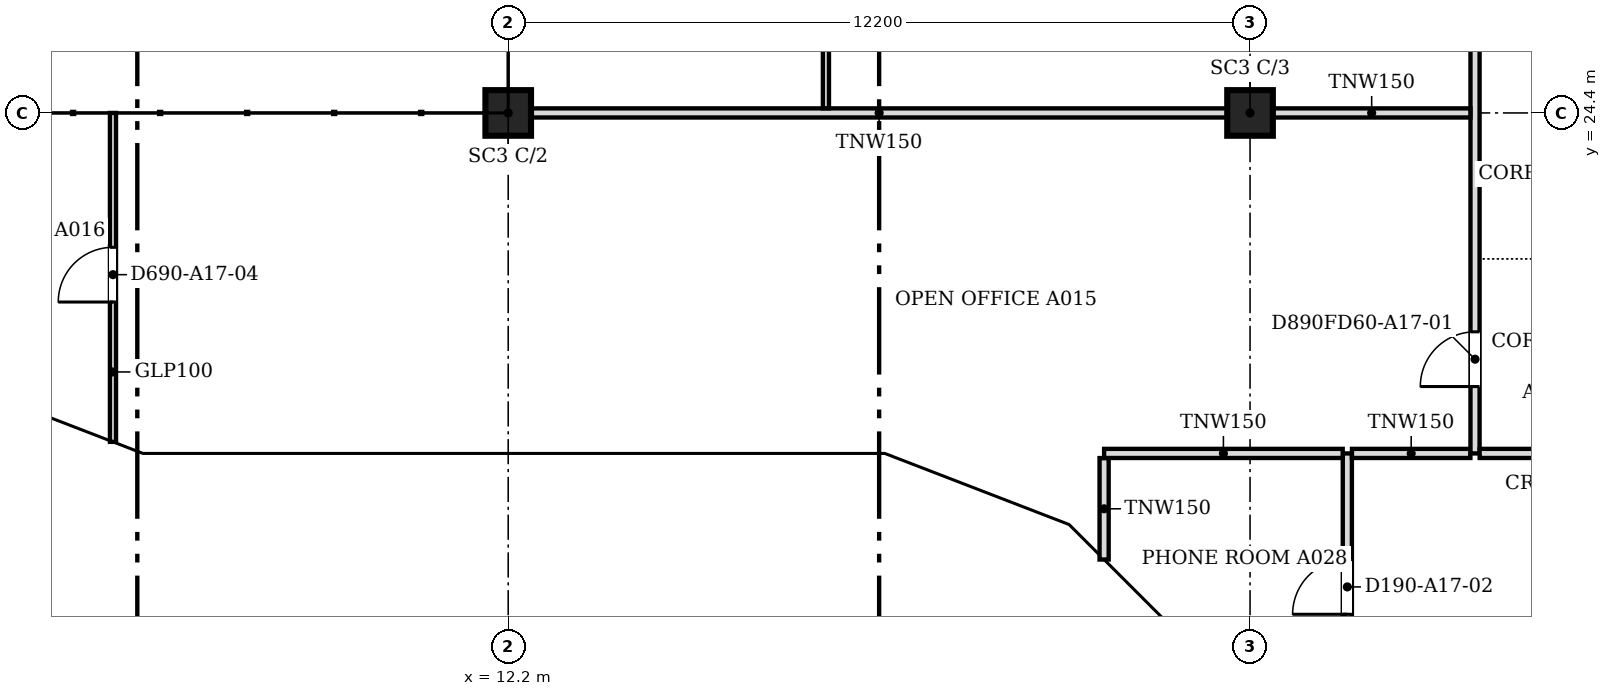
"""IFC4 building model, lengths in metres.
Left out: names, types, materials, properties, quantities, classifications, styles, units other than length and angle.
Written with IfcOpenShell. Run it as: python <this file> out.ifc"""

import sys

from ifc_helpers import new_model, si_unit, direction, frame, frame_2d, origin, origin_2d, place, context, subcontext, project, spatial, polyline, rectangle, outline, extrude, faceted_brep, source, transform, mapped, element, fill, save


model = new_model("IFC4")
c1 = context("Model", 3, precision=1e-05, world=origin(), true_north=direction((0.0, 1.0)))
c2 = subcontext(c1, "Body", "Model", "MODEL_VIEW")
j1 = project(units=[si_unit("LENGTHUNIT", "METRE"), si_unit("PLANEANGLEUNIT", "RADIAN")], contexts=[c1])
p1 = place(None, origin())
s1 = spatial("IfcSite", under=j1, at=p1, CompositionType="ELEMENT")
p2 = place(p1, origin())
s2 = spatial("IfcBuilding", under=s1, at=p2, CompositionType="ELEMENT")
p3 = place(p2, frame((0.0, 0.0, 185.8)))
s3 = spatial("IfcBuildingStorey", under=s2, at=p3, CompositionType="ELEMENT", Elevation=185.8)
for number, where, z_axis, x_axis in (
    (1, (12.2, 24.4, 0.0), (0.0, 0.0, 1.0), (1.0, 0.0, 0.0)),
    (2, (24.4, 24.4, 0.0), (0.0, 0.0, 1.0), (1.0, 0.0, 0.0)),
):
    element("IfcColumn", number, at=place(p3, frame(where, z_axis=z_axis, x_axis=x_axis)), inside=s3, PredefinedType="COLUMN", context=c2, shape_type="SweptSolid", body=[
        extrude(rectangle(XDim=0.75, YDim=0.75, at=origin_2d()), origin(), (0.0, 0.0, 1.0), 3.6),
    ])
m1 = source(origin(), c2, "Body", "Brep", [
    faceted_brep([(2.95, -0.25, 0.0), (2.997, -0.25, 0.059), (2.997, -0.25, 7.541), (2.95, -0.25, 7.6), (0.0, -0.25, 3.8), (0.053, 0.25, 3.868), (2.904, 0.25, 7.54), (2.904, 0.25, 0.06), (0.053, 0.25, 3.732), (2.95, 0.0, 0.0), (2.95, 0.0, 7.6), (0.0, 0.0, 3.8)], [[[0, 1, 2, 3, 4]], [[5, 6, 7, 8]], [[1, 0, 9]], [[10, 3, 2]], [[6, 5, 11, 4, 3, 10]], [[8, 7, 9, 0, 4, 11]], [[8, 11, 5]], [[1, 9, 7, 6, 10, 2]]]),
])
p4 = place(p3, frame((3.394, 19.612, -3.8), z_axis=(0.0, 0.0, 1.0), x_axis=(0.932990326376, -0.359901446078, 0.0)))
e3 = element("IfcWall", 3, at=p4, inside=s3, PredefinedType="SOLIDWALL", context=c2, shape_type="MappedRepresentation", body=[
    mapped(m1, transform((0.0, 0.0, 0.0), scale=1.0)),
])
m2 = source(origin(), c2, "Body", "SweptSolid", [
    extrude(outline(polyline([(2.75, 6.935), (0.316, 3.8), (2.75, 0.665), (2.75, 6.935)])), frame((0.0, 0.26, 0.0), z_axis=(0.0, -1.0, 0.0), x_axis=(1.0, 0.0, 0.0)), (0.0, 0.0, 1.0), 0.52),
])
p5 = place(p4, origin())
e4 = element("IfcOpeningElement", 4, at=p5, cuts=e3, PredefinedType="OPENING", context=c2, shape_type="MappedRepresentation", body=[
    mapped(m2, transform((0.0, 0.0, 0.0), scale=1.0)),
])
m3 = source(origin(), c2, "Body", "Brep", [
    faceted_brep([(0.047, -0.25, 0.0), (3.05, -0.25, 3.8), (0.047, -0.25, 7.6), (0.0, -0.25, 7.54), (0.0, -0.25, 0.06), (0.093, 0.25, 7.541), (3.05, 0.25, 3.8), (0.093, 0.25, 0.059), (0.047, 0.0, 0.0), (0.047, 0.0, 7.6)], [[[0, 1, 2, 3, 4]], [[5, 6, 7]], [[7, 6, 1, 0, 8]], [[6, 5, 9, 2, 1]], [[3, 2, 9]], [[8, 0, 4]], [[7, 8, 4, 3, 9, 5]]]),
])
p6 = place(p3, frame((6.1, 18.55, -3.8), z_axis=(0.0, 0.0, 1.0), x_axis=(1.0, 0.0, 0.0)))
e5 = element("IfcWall", 5, at=p6, inside=s3, PredefinedType="SOLIDWALL", context=c2, shape_type="MappedRepresentation", body=[
    mapped(m3, transform((0.0, 0.0, 0.0), scale=1.0)),
])
m4 = source(origin(), c2, "Body", "SweptSolid", [
    extrude(outline(polyline([(0.247, 0.656), (2.731, 3.8), (0.247, 6.944), (0.247, 0.656)])), frame((0.0, 0.26, 0.0), z_axis=(0.0, -1.0, 0.0), x_axis=(1.0, 0.0, 0.0)), (0.0, 0.0, 1.0), 0.52),
])
p7 = place(p6, origin())
e6 = element("IfcOpeningElement", 6, at=p7, cuts=e5, PredefinedType="OPENING", context=c2, shape_type="MappedRepresentation", body=[
    mapped(m4, transform((0.0, 0.0, 0.0), scale=1.0)),
])
m5 = source(origin(), c2, "Body", "SweptSolid", [
    extrude(outline(polyline([(3.05, 0.0), (6.1, 3.8), (3.05, 7.6), (0.0, 3.8), (3.05, 0.0)])), frame((0.0, 0.25, 0.0), z_axis=(0.0, -1.0, 0.0), x_axis=(1.0, 0.0, 0.0)), (0.0, 0.0, 1.0), 0.5),
])
p8 = place(p3, frame((9.15, 18.55, -3.8), z_axis=(0.0, 0.0, 1.0), x_axis=(1.0, 0.0, 0.0)))
e7 = element("IfcWall", 7, at=p8, inside=s3, PredefinedType="SOLIDWALL", context=c2, shape_type="MappedRepresentation", body=[
    mapped(m5, transform((0.0, 0.0, 0.0), scale=1.0)),
])
m6 = source(origin(), c2, "Body", "SweptSolid", [
    extrude(outline(polyline([(3.05, 0.399), (5.78, 3.8), (3.05, 7.201), (0.321, 3.8), (3.05, 0.399)])), frame((0.0, 0.26, 0.0), z_axis=(0.0, -1.0, 0.0), x_axis=(1.0, 0.0, 0.0)), (0.0, 0.0, 1.0), 0.52),
])
p9 = place(p8, origin())
e8 = element("IfcOpeningElement", 8, at=p9, cuts=e7, PredefinedType="OPENING", context=c2, shape_type="MappedRepresentation", body=[
    mapped(m6, transform((0.0, 0.0, 0.0), scale=1.0)),
])
m7 = source(origin(), c2, "Body", "Brep", [
    faceted_brep([(3.05, -0.25, 7.543), (0.0, -0.25, 3.8), (3.05, -0.25, 0.057), (0.0, 0.25, 3.8), (3.096, 0.25, 7.6), (3.143, 0.25, 7.544), (3.143, 0.25, 0.056), (3.096, 0.25, 0.0), (3.096, -0.0, 0.0), (3.096, -0.0, 7.6)], [[[0, 1, 2]], [[3, 4, 5, 6, 7]], [[7, 6, 8]], [[5, 4, 9]], [[4, 3, 1, 0, 9]], [[3, 7, 8, 2, 1]], [[2, 8, 6, 5, 9, 0]]]),
])
p10 = place(p3, frame((15.25, 18.55, -3.8), z_axis=(0.0, 0.0, 1.0), x_axis=(1.0, 0.0, 0.0)))
e9 = element("IfcWall", 9, at=p10, inside=s3, PredefinedType="SOLIDWALL", context=c2, shape_type="MappedRepresentation", body=[
    mapped(m7, transform((0.0, 0.0, 0.0), scale=1.0)),
])
m8 = source(origin(), c2, "Body", "SweptSolid", [
    extrude(outline(polyline([(2.896, 6.959), (0.323, 3.8), (2.896, 0.641), (2.896, 6.959)])), frame((0.0, 0.26, 0.0), z_axis=(0.0, -1.0, 0.0), x_axis=(1.0, 0.0, 0.0)), (0.0, 0.0, 1.0), 0.52),
])
p11 = place(p10, origin())
e10 = element("IfcOpeningElement", 10, at=p11, cuts=e9, PredefinedType="OPENING", context=c2, shape_type="MappedRepresentation", body=[
    mapped(m8, transform((0.0, 0.0, 0.0), scale=1.0)),
])
m9 = source(origin(), c2, "Body", "Brep", [
    faceted_brep([(0.093, -0.25, 0.056), (3.143, -0.25, 3.736), (3.143, -0.25, 3.864), (0.093, -0.25, 7.544), (0.0, 0.25, 7.543), (0.047, 0.25, 7.6), (3.196, 0.25, 3.8), (0.047, 0.25, 0.0), (0.0, 0.25, 0.057), (3.196, -0.0, 3.8), (0.047, 0.0, 0.0), (0.047, 0.0, 7.6)], [[[0, 1, 2, 3]], [[4, 5, 6, 7, 8]], [[7, 6, 9, 1, 0, 10]], [[6, 5, 11, 3, 2, 9]], [[5, 4, 11]], [[8, 7, 10]], [[8, 10, 0, 3, 11, 4]], [[1, 9, 2]]]),
])
p12 = place(p3, frame((18.303, 18.567, -3.8), z_axis=(0.0, 0.0, 1.0), x_axis=(0.932978940178, -0.359930961693, 0.0)))
e11 = element("IfcWall", 11, at=p12, inside=s3, PredefinedType="SOLIDWALL", context=c2, shape_type="MappedRepresentation", body=[
    mapped(m9, transform((0.0, 0.0, 0.0), scale=1.0)),
])
m10 = source(origin(), c2, "Body", "SweptSolid", [
    extrude(outline(polyline([(0.247, 0.633), (2.871, 3.8), (0.247, 6.967), (0.247, 0.633)])), frame((0.0, 0.26, 0.0), z_axis=(0.0, -1.0, 0.0), x_axis=(1.0, 0.0, 0.0)), (0.0, 0.0, 1.0), 0.52),
])
p13 = place(p12, origin())
e12 = element("IfcOpeningElement", 12, at=p13, cuts=e11, PredefinedType="OPENING", context=c2, shape_type="MappedRepresentation", body=[
    mapped(m10, transform((0.0, 0.0, 0.0), scale=1.0)),
])
m11 = source(origin(), c2, "Body", "Brep", [
    faceted_brep([(3.103, -0.25, 7.536), (0.053, -0.25, 3.864), (0.053, -0.25, 3.736), (3.103, -0.25, 0.064), (0.0, 0.25, 3.8), (3.156, 0.25, 7.6), (3.209, 0.25, 7.536), (3.209, 0.25, 0.064), (3.156, 0.25, 0.0), (3.156, -0.0, 0.0), (3.156, -0.0, 7.6), (0.0, 0.0, 3.8)], [[[0, 1, 2, 3]], [[4, 5, 6, 7, 8]], [[8, 7, 9]], [[6, 5, 10]], [[5, 4, 11, 1, 0, 10]], [[4, 8, 9, 3, 2, 11]], [[11, 2, 1]], [[3, 9, 7, 6, 10, 0]]]),
])
p14 = place(p3, frame((21.285, 17.417, -3.8), z_axis=(0.0, 0.0, 1.0), x_axis=(0.707106781187, -0.707106781187, 0.0)))
e13 = element("IfcWall", 13, at=p14, inside=s3, PredefinedType="SOLIDWALL", context=c2, shape_type="MappedRepresentation", body=[
    mapped(m11, transform((0.0, 0.0, 0.0), scale=1.0)),
])
m12 = source(origin(), c2, "Body", "SweptSolid", [
    extrude(outline(polyline([(2.956, 6.968), (0.325, 3.8), (2.956, 0.632), (2.956, 6.968)])), frame((0.0, 0.26, 0.0), z_axis=(0.0, -1.0, 0.0), x_axis=(1.0, 0.0, 0.0)), (0.0, 0.0, 1.0), 0.52),
])
p15 = place(p14, origin())
e14 = element("IfcOpeningElement", 14, at=p15, cuts=e13, PredefinedType="OPENING", context=c2, shape_type="MappedRepresentation", body=[
    mapped(m12, transform((0.0, 0.0, 0.0), scale=1.0)),
])
p16 = place(p2, frame((0.0, 0.0, 189.6)))
s4 = spatial("IfcBuildingStorey", under=s2, at=p16, CompositionType="ELEMENT", Elevation=189.6)
m13 = source(origin(), c2, "Body", "Brep", [
    faceted_brep([(0.053, -0.25, 0.0), (3.003, -0.25, 3.8), (0.053, -0.25, 7.6), (0.0, -0.25, 7.531), (0.0, -0.25, 0.068), (0.106, 0.25, 7.532), (2.957, 0.25, 3.86), (2.957, 0.25, 3.74), (0.106, 0.25, 0.068), (3.003, 0.0, 3.8), (0.053, 0.0, 0.0), (0.053, 0.0, 7.6)], [[[0, 1, 2, 3, 4]], [[5, 6, 7, 8]], [[8, 7, 9, 1, 0, 10]], [[6, 5, 11, 2, 1, 9]], [[3, 2, 11]], [[10, 0, 4]], [[8, 10, 4, 3, 11, 5]], [[7, 6, 9]]]),
])
p17 = place(p16, frame((3.344, 19.631, -3.8), z_axis=(0.0, 0.0, 1.0), x_axis=(0.933007896601, -0.359855894603, 0.0)))
e15 = element("IfcWall", 15, at=p17, inside=s4, PredefinedType="SOLIDWALL", context=c2, shape_type="MappedRepresentation", body=[
    mapped(m13, transform((0.0, 0.0, 0.0), scale=1.0)),
])
m14 = source(origin(), c2, "Body", "SweptSolid", [
    extrude(outline(polyline([(0.253, 0.665), (2.687, 3.8), (0.253, 6.935), (0.253, 0.665)])), frame((0.0, 0.26, 0.0), z_axis=(0.0, -1.0, 0.0), x_axis=(1.0, 0.0, 0.0)), (0.0, 0.0, 1.0), 0.52),
])
p18 = place(p17, origin())
e16 = element("IfcOpeningElement", 16, at=p18, cuts=e15, PredefinedType="OPENING", context=c2, shape_type="MappedRepresentation", body=[
    mapped(m14, transform((0.0, 0.0, 0.0), scale=1.0)),
])
m15 = source(origin(), c2, "Body", "Brep", [
    faceted_brep([(3.003, -0.25, 0.0), (6.053, -0.25, 3.8), (3.003, -0.25, 7.6), (0.0, -0.25, 3.8), (0.047, 0.25, 3.859), (3.003, 0.25, 7.6), (6.053, 0.25, 3.8), (3.003, 0.25, 0.0), (0.047, 0.25, 3.741), (0.0, 0.0, 3.8)], [[[0, 1, 2, 3]], [[4, 5, 6, 7, 8]], [[7, 6, 1, 0]], [[6, 5, 2, 1]], [[5, 4, 9, 3, 2]], [[8, 7, 0, 3, 9]], [[8, 9, 4]]]),
])
p19 = place(p16, frame((6.146, 18.55, -3.8), z_axis=(0.0, 0.0, 1.0), x_axis=(1.0, 0.0, 0.0)))
e17 = element("IfcWall", 17, at=p19, inside=s4, PredefinedType="SOLIDWALL", context=c2, shape_type="MappedRepresentation", body=[
    mapped(m15, transform((0.0, 0.0, 0.0), scale=1.0)),
])
m16 = source(origin(), c2, "Body", "SweptSolid", [
    extrude(outline(polyline([(3.005, 0.401), (5.733, 3.8), (3.005, 7.199), (0.319, 3.8), (3.005, 0.401)])), frame((0.0, 0.26, 0.0), z_axis=(0.0, -1.0, 0.0), x_axis=(1.0, 0.0, 0.0)), (0.0, 0.0, 1.0), 0.52),
])
p20 = place(p19, origin())
e18 = element("IfcOpeningElement", 18, at=p20, cuts=e17, PredefinedType="OPENING", context=c2, shape_type="MappedRepresentation", body=[
    mapped(m16, transform((0.0, 0.0, 0.0), scale=1.0)),
])
m17 = source(origin(), c2, "Body", "Brep", [
    faceted_brep([(3.05, -0.25, 0.0), (6.1, -0.25, 3.743), (6.1, -0.25, 3.857), (3.05, -0.25, 7.6), (0.0, -0.25, 3.8), (0.0, 0.25, 3.8), (3.05, 0.25, 7.6), (6.146, 0.25, 3.8), (3.05, 0.25, 0.0), (6.146, -0.0, 3.8)], [[[0, 1, 2, 3, 4]], [[5, 6, 7, 8]], [[8, 7, 9, 1, 0]], [[7, 6, 3, 2, 9]], [[6, 5, 4, 3]], [[5, 8, 0, 4]], [[1, 9, 2]]]),
])
p21 = place(p16, frame((12.2, 18.55, -3.8), z_axis=(0.0, 0.0, 1.0), x_axis=(1.0, 0.0, 0.0)))
e19 = element("IfcWall", 19, at=p21, inside=s4, PredefinedType="SOLIDWALL", context=c2, shape_type="MappedRepresentation", body=[
    mapped(m17, transform((0.0, 0.0, 0.0), scale=1.0)),
])
m18 = source(origin(), c2, "Body", "SweptSolid", [
    extrude(outline(polyline([(3.052, 0.397), (5.824, 3.8), (3.052, 7.202), (0.321, 3.8), (3.052, 0.397)])), frame((0.0, 0.26, 0.0), z_axis=(0.0, -1.0, 0.0), x_axis=(1.0, 0.0, 0.0)), (0.0, 0.0, 1.0), 0.52),
])
p22 = place(p21, origin())
e20 = element("IfcOpeningElement", 20, at=p22, cuts=e19, PredefinedType="OPENING", context=c2, shape_type="MappedRepresentation", body=[
    mapped(m18, transform((0.0, 0.0, 0.0), scale=1.0)),
])
m19 = source(origin(), c2, "Body", "Brep", [
    faceted_brep([(3.096, -0.25, 7.536), (0.047, -0.25, 3.856), (0.047, -0.25, 3.744), (3.096, -0.25, 0.064), (0.0, 0.25, 3.8), (3.149, 0.25, 7.6), (3.202, 0.25, 7.536), (3.202, 0.25, 0.064), (3.149, 0.25, 0.0), (3.149, -0.0, 0.0), (3.149, -0.0, 7.6), (0.0, 0.0, 3.8)], [[[0, 1, 2, 3]], [[4, 5, 6, 7, 8]], [[8, 7, 9]], [[6, 5, 10]], [[5, 4, 11, 1, 0, 10]], [[4, 8, 9, 3, 2, 11]], [[2, 1, 11]], [[3, 9, 7, 6, 10, 0]]]),
])
p23 = place(p16, frame((18.346, 18.55, -3.8), z_axis=(0.0, 0.0, 1.0), x_axis=(0.932985567668, -0.359913782069, 0.0)))
e21 = element("IfcWall", 21, at=p23, inside=s4, PredefinedType="SOLIDWALL", context=c2, shape_type="MappedRepresentation", body=[
    mapped(m19, transform((0.0, 0.0, 0.0), scale=1.0)),
])
m20 = source(origin(), c2, "Body", "SweptSolid", [
    extrude(outline(polyline([(2.949, 6.967), (0.325, 3.8), (2.949, 0.633), (2.949, 6.967)])), frame((0.0, 0.26, 0.0), z_axis=(0.0, -1.0, 0.0), x_axis=(1.0, 0.0, 0.0)), (0.0, 0.0, 1.0), 0.52),
])
p24 = place(p23, origin())
e22 = element("IfcOpeningElement", 22, at=p24, cuts=e21, PredefinedType="OPENING", context=c2, shape_type="MappedRepresentation", body=[
    mapped(m20, transform((0.0, 0.0, 0.0), scale=1.0)),
])
m21 = source(origin(), c2, "Body", "Brep", [
    faceted_brep([(0.106, -0.25, 0.064), (3.156, -0.25, 3.736), (3.156, -0.25, 3.864), (0.106, -0.25, 7.536), (0.0, 0.25, 7.536), (0.053, 0.25, 7.6), (3.209, 0.25, 3.8), (0.053, 0.25, 0.0), (0.0, 0.25, 0.064), (3.209, -0.0, 3.8), (0.053, 0.0, 0.0), (0.053, 0.0, 7.6)], [[[0, 1, 2, 3]], [[4, 5, 6, 7, 8]], [[7, 6, 9, 1, 0, 10]], [[6, 5, 11, 3, 2, 9]], [[5, 4, 11]], [[8, 7, 10]], [[8, 10, 0, 3, 11, 4]], [[1, 9, 2]]]),
])
p25 = place(p16, frame((21.248, 17.454, -3.8), z_axis=(0.0, 0.0, 1.0), x_axis=(0.707106781187, -0.707106781187, 0.0)))
e23 = element("IfcWall", 23, at=p25, inside=s4, PredefinedType="SOLIDWALL", context=c2, shape_type="MappedRepresentation", body=[
    mapped(m21, transform((0.0, 0.0, 0.0), scale=1.0)),
])
m22 = source(origin(), c2, "Body", "SweptSolid", [
    extrude(outline(polyline([(0.253, 0.632), (2.884, 3.8), (0.253, 6.968), (0.253, 0.632)])), frame((0.0, 0.26, 0.0), z_axis=(0.0, -1.0, 0.0), x_axis=(1.0, 0.0, 0.0)), (0.0, 0.0, 1.0), 0.52),
])
p26 = place(p25, origin())
e24 = element("IfcOpeningElement", 24, at=p26, cuts=e23, PredefinedType="OPENING", context=c2, shape_type="MappedRepresentation", body=[
    mapped(m22, transform((0.0, 0.0, 0.0), scale=1.0)),
])
p27 = place(p3, frame((26.0, 10.276, 0.0), z_axis=(0.0, 0.0, 1.0), x_axis=(0.0, 1.0, 0.0)))
e25 = element("IfcWall", 25, at=p27, inside=s3, PredefinedType="PARTITIONING", context=c2, shape_type="SweptSolid", body=[
    extrude(rectangle(XDim=8.524, YDim=0.15, at=frame_2d((4.262, 0.0))), origin(), (0.0, 0.0, 1.0), 3.067),
])
m23 = source(origin(), c2, "Body", "SweptSolid", [
    extrude(rectangle(XDim=0.9, YDim=2.1, at=frame_2d((0.45, 1.05))), frame((0.0, 0.085, 0.0), z_axis=(0.0, -1.0, 0.0), x_axis=(1.0, 0.0, 0.0)), (0.0, 0.0, 1.0), 0.17),
])
p28 = place(p27, frame((1.6, 0.0, 0.0)))
e26 = element("IfcOpeningElement", 26, at=p28, cuts=e25, PredefinedType="OPENING", context=c2, shape_type="MappedRepresentation", body=[
    mapped(m23, transform((0.0, 0.0, 0.0), scale=1.0)),
])
p29 = place(p27, frame((5.879, 0.0, 0.0)))
e27 = element("IfcOpeningElement", 27, at=p29, cuts=e25, PredefinedType="OPENING", context=c2, shape_type="MappedRepresentation", body=[
    mapped(m23, transform((0.0, 0.0, 0.0), scale=1.0)),
])
p30 = place(p3, frame((22.0, 17.055, 0.0), z_axis=(0.0, 0.0, 1.0), x_axis=(0.0, 1.0, 0.0)))
e28 = element("IfcWall", 28, at=p30, inside=s3, PredefinedType="PARTITIONING", context=c2, shape_type="SweptSolid", body=[
    extrude(rectangle(XDim=1.669, YDim=0.15, at=frame_2d((0.834, 0.0))), origin(), (0.0, 0.0, 1.0), 3.067),
])
p31 = place(p3, frame((22.0, 18.8, 0.0), z_axis=(0.0, 0.0, 1.0), x_axis=(1.0, 0.0, 0.0)))
e29 = element("IfcWall", 29, at=p31, inside=s3, PredefinedType="PARTITIONING", context=c2, shape_type="SweptSolid", body=[
    extrude(rectangle(XDim=3.924, YDim=0.15, at=frame_2d((1.962, 0.0))), origin(), (0.0, 0.0, 1.0), 3.067),
])
p32 = place(p3, frame((26.076, 18.8, 0.0), z_axis=(0.0, 0.0, 1.0), x_axis=(1.0, 0.0, 0.0)))
e30 = element("IfcWall", 30, at=p32, inside=s3, PredefinedType="PARTITIONING", context=c2, shape_type="SweptSolid", body=[
    extrude(rectangle(XDim=1.948, YDim=0.15, at=frame_2d((0.974, 0.0))), origin(), (0.0, 0.0, 1.0), 3.067),
])
p33 = place(p3, frame((28.1, 18.8, 0.0), z_axis=(0.0, 0.0, 1.0), x_axis=(0.0, 1.0, 0.0)))
e31 = element("IfcWall", 31, at=p33, inside=s3, PredefinedType="PARTITIONING", context=c2, shape_type="SweptSolid", body=[
    extrude(rectangle(XDim=26.424, YDim=0.15, at=frame_2d((13.212, 0.0))), origin(), (0.0, 0.0, 1.0), 3.067),
])
p34 = place(p33, frame((1.1, 0.0, 0.0)))
e32 = element("IfcOpeningElement", 32, at=p34, cuts=e31, PredefinedType="OPENING", context=c2, shape_type="MappedRepresentation", body=[
    mapped(m23, transform((0.0, 0.0, 0.0), scale=1.0)),
])
p35 = place(p33, frame((14.301, 0.0, 0.0)))
e33 = element("IfcOpeningElement", 33, at=p35, cuts=e31, PredefinedType="OPENING", context=c2, shape_type="MappedRepresentation", body=[
    mapped(m23, transform((0.0, 0.0, 0.0), scale=1.0)),
])
p36 = place(p33, frame((8.2, 0.0, 0.0)))
e34 = element("IfcOpeningElement", 34, at=p36, cuts=e31, PredefinedType="OPENING", context=c2, shape_type="MappedRepresentation", body=[
    mapped(m23, transform((0.0, 0.0, 0.0), scale=1.0)),
])
m24 = source(origin(), c2, "Body", "SweptSolid", [
    extrude(rectangle(XDim=1.0, YDim=2.1, at=frame_2d((0.5, 1.05))), frame((0.0, 0.085, 0.0), z_axis=(0.0, -1.0, 0.0), x_axis=(1.0, 0.0, 0.0)), (0.0, 0.0, 1.0), 0.17),
])
p37 = place(p33, frame((21.6, 0.0, 0.0)))
e35 = element("IfcOpeningElement", 35, at=p37, cuts=e31, PredefinedType="OPENING", context=c2, shape_type="MappedRepresentation", body=[
    mapped(m24, transform((0.0, 0.0, 0.0), scale=1.0)),
])
p38 = place(p3, frame((28.176, 18.8, 0.0), z_axis=(0.0, 0.0, 1.0), x_axis=(1.0, 0.0, 0.0)))
e36 = element("IfcWall", 36, at=p38, inside=s3, PredefinedType="PARTITIONING", context=c2, shape_type="SweptSolid", body=[
    extrude(rectangle(XDim=2.248, YDim=0.15, at=frame_2d((1.124, 0.0))), origin(), (0.0, 0.0, 1.0), 3.067),
])
p39 = place(p3, frame((5.7, 18.99, 0.0), z_axis=(0.0, 0.0, 1.0), x_axis=(0.0, 1.0, 0.0)))
e37 = element("IfcWall", 37, at=p39, inside=s3, PredefinedType="PARTITIONING", context=c2, shape_type="SweptSolid", body=[
    extrude(rectangle(XDim=5.41, YDim=0.1, at=frame_2d((2.705, 0.0))), origin(), (0.0, 0.0, 1.0), 3.067),
])
m25 = source(origin(), c2, "Body", "SweptSolid", [
    extrude(rectangle(XDim=0.9, YDim=2.1, at=frame_2d((0.45, 1.05))), frame((0.0, 0.06, 0.0), z_axis=(0.0, -1.0, 0.0), x_axis=(1.0, 0.0, 0.0)), (0.0, 0.0, 1.0), 0.12),
])
p40 = place(p39, frame((2.3, 0.0, 0.0)))
e38 = element("IfcOpeningElement", 38, at=p40, cuts=e37, PredefinedType="OPENING", context=c2, shape_type="MappedRepresentation", body=[
    mapped(m25, transform((0.0, 0.0, 0.0), scale=1.0)),
])
p41 = place(p3, frame((12.576, 24.4, 0.0), z_axis=(0.0, 0.0, 1.0), x_axis=(1.0, 0.0, 0.0)))
e39 = element("IfcWall", 39, at=p41, inside=s3, PredefinedType="PARTITIONING", context=c2, shape_type="SweptSolid", body=[
    extrude(rectangle(XDim=11.448, YDim=0.15, at=frame_2d((5.724, 0.0))), origin(), (0.0, 0.0, 1.0), 3.067),
])
p42 = place(p3, frame((24.776, 24.4, 0.0), z_axis=(0.0, 0.0, 1.0), x_axis=(1.0, 0.0, 0.0)))
e40 = element("IfcWall", 40, at=p42, inside=s3, PredefinedType="PARTITIONING", context=c2, shape_type="SweptSolid", body=[
    extrude(rectangle(XDim=3.248, YDim=0.15, at=frame_2d((1.624, 0.0))), origin(), (0.0, 0.0, 1.0), 3.067),
])
p43 = place(p3, frame((17.425, 24.476, 0.0), z_axis=(0.0, 0.0, 1.0), x_axis=(0.0, 1.0, 0.0)))
e41 = element("IfcWall", 41, at=p43, inside=s3, PredefinedType="PARTITIONING", context=c2, shape_type="SweptSolid", body=[
    extrude(rectangle(XDim=5.948, YDim=0.1, at=frame_2d((2.974, 0.0))), origin(), (0.0, 0.0, 1.0), 3.067),
])
p44 = place(p43, frame((2.5, 0.0, 0.0)))
e42 = element("IfcOpeningElement", 42, at=p44, cuts=e41, PredefinedType="OPENING", context=c2, shape_type="MappedRepresentation", body=[
    mapped(m25, transform((0.0, 0.0, 0.0), scale=1.0)),
])
m26 = source(origin(), c2, "Body", "SweptSolid", [
    extrude(rectangle(XDim=0.9, YDim=2.1, at=frame_2d((0.45, 1.05))), frame((0.0, 0.025, 0.0), z_axis=(0.0, -1.0, 0.0), x_axis=(1.0, 0.0, 0.0)), (0.0, 0.0, 1.0), 0.05),
])
p45 = place(p34, origin())
e43 = element("IfcDoor", 43, at=p45, inside=s3, OperationType="SINGLE_SWING_LEFT", PredefinedType="DOOR", context=c2, shape_type="MappedRepresentation", body=[
    mapped(m26, transform((0.0, 0.0, 0.0), scale=1.0)),
])
fill(e32, e43)
p46 = place(p29, origin())
e44 = element("IfcDoor", 44, at=p46, inside=s3, OperationType="SINGLE_SWING_LEFT", PredefinedType="DOOR", context=c2, shape_type="MappedRepresentation", body=[
    mapped(m26, transform((0.0, 0.0, 0.0), scale=1.0)),
])
fill(e27, e44)
p47 = place(p40, origin())
e45 = element("IfcDoor", 45, at=p47, inside=s3, OperationType="SINGLE_SWING_LEFT", PredefinedType="DOOR", context=c2, shape_type="MappedRepresentation", body=[
    mapped(m26, transform((0.0, 0.0, 0.0), scale=1.0)),
])
fill(e38, e45)
save(model, sys.argv[1])
